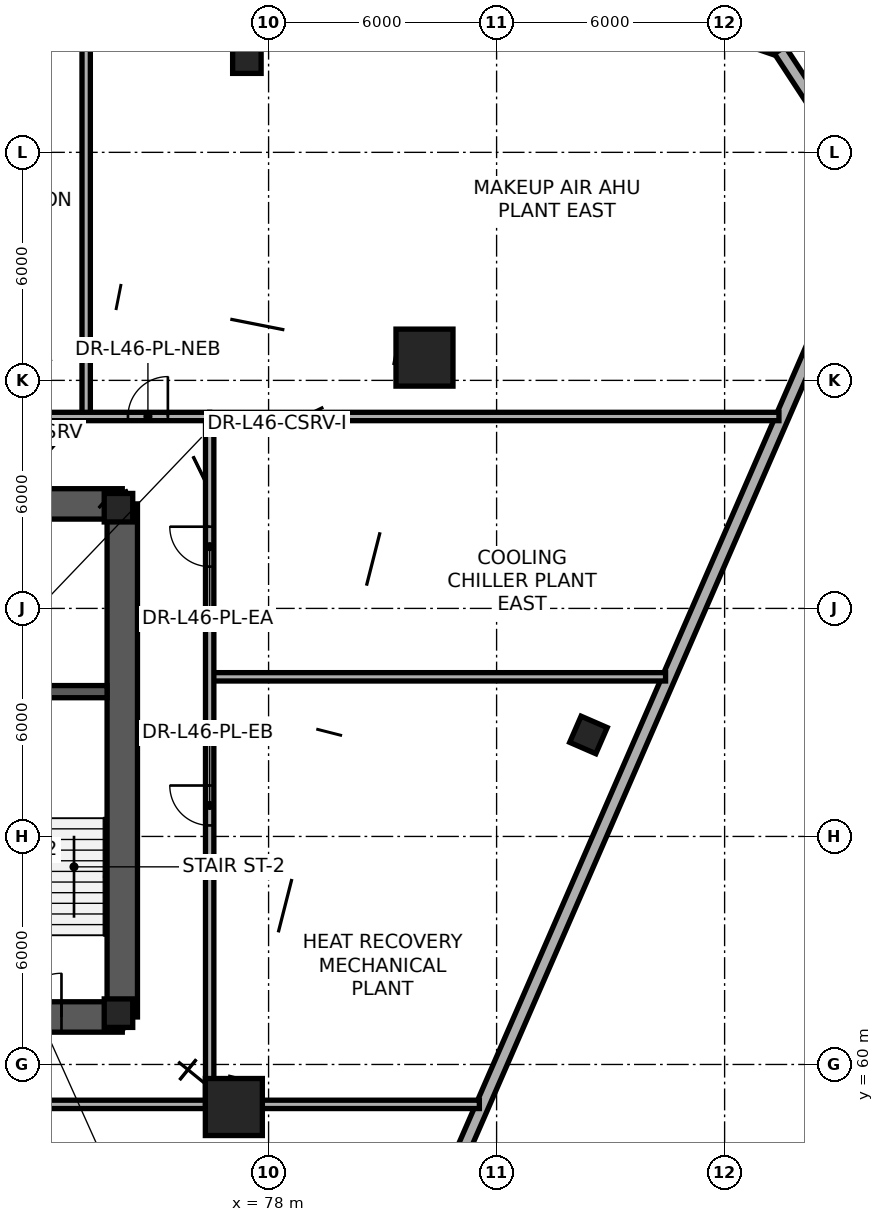
"""IFC4 building model, lengths in metres.
Left out: names, types, materials, properties, quantities, classifications, styles, units other than length and angle.
Written with IfcOpenShell. Run it as: python <this file> out.ifc"""

import sys

from ifc_helpers import new_model, si_unit, direction, frame, frame_2d, origin, origin_2d, place, context, subcontext, project, spatial, rectangle, extrude, element, fill, save


model = new_model("IFC4")
c1 = context("Model", 3, precision=1e-05, world=origin(), true_north=direction((0.0, 1.0)))
c2 = subcontext(c1, "Body", "Model", "MODEL_VIEW")
j1 = project(units=[si_unit("LENGTHUNIT", "METRE"), si_unit("PLANEANGLEUNIT", "RADIAN")], contexts=[c1])
p1 = place(None, origin())
s1 = spatial("IfcSite", under=j1, at=p1, CompositionType="ELEMENT")
p2 = place(p1, origin())
s2 = spatial("IfcBuilding", under=s1, at=p2, CompositionType="ELEMENT")
p3 = place(p2, frame((0.0, 0.0, 175.2)))
s3 = spatial("IfcBuildingStorey", under=s2, at=p3, CompositionType="ELEMENT", Elevation=175.2)
p4 = place(p3, frame((57.85, 61.25, 0.0), z_axis=(0.0, 0.0, 1.0), x_axis=(1.0, 0.0, 0.0)))
e1 = element("IfcWall", 1, at=p4, inside=s3, PredefinedType="SHEAR", context=c2, shape_type="SweptSolid", body=[
    extrude(rectangle(XDim=16.3, YDim=0.8, at=frame_2d((8.15, 0.0))), origin(), (0.0, 0.0, 1.0), 4.2),
])
p5 = place(p4, frame((1.35, 0.0, 0.0)))
e2 = element("IfcOpeningElement", 2, at=p5, cuts=e1, PredefinedType="OPENING", context=c2, shape_type="SweptSolid", body=[
    extrude(rectangle(XDim=1.15, YDim=2.15, at=frame_2d((0.575, 1.075))), frame((0.0, 0.41, 0.0), z_axis=(0.0, -1.0, 0.0), x_axis=(1.0, 0.0, 0.0)), (0.0, 0.0, 1.0), 0.82),
])
p6 = place(p4, frame((6.1, 0.0, 0.0)))
e3 = element("IfcOpeningElement", 3, at=p6, cuts=e1, PredefinedType="OPENING", context=c2, shape_type="SweptSolid", body=[
    extrude(rectangle(XDim=1.6, YDim=2.15, at=frame_2d((0.8, 1.075))), frame((0.0, 0.41, 0.0), z_axis=(0.0, -1.0, 0.0), x_axis=(1.0, 0.0, 0.0)), (0.0, 0.0, 1.0), 0.82),
])
p7 = place(p4, frame((13.55, 0.0, 0.0)))
e4 = element("IfcOpeningElement", 4, at=p7, cuts=e1, PredefinedType="OPENING", context=c2, shape_type="SweptSolid", body=[
    extrude(rectangle(XDim=1.15, YDim=2.15, at=frame_2d((0.575, 1.075))), frame((0.0, 0.41, 0.0), z_axis=(0.0, -1.0, 0.0), x_axis=(1.0, 0.0, 0.0)), (0.0, 0.0, 1.0), 0.82),
])
p8 = place(p3, frame((74.15, 61.25, 0.0), z_axis=(0.0, 0.0, 1.0), x_axis=(0.0, 1.0, 0.0)))
e5 = element("IfcWall", 5, at=p8, inside=s3, PredefinedType="SHEAR", context=c2, shape_type="SweptSolid", body=[
    extrude(rectangle(XDim=13.5, YDim=0.8, at=frame_2d((6.75, 0.0))), origin(), (0.0, 0.0, 1.0), 4.2),
])
p9 = place(p3, frame((74.15, 74.75, 0.0), z_axis=(0.0, 0.0, 1.0), x_axis=(-1.0, 0.0, 0.0)))
e6 = element("IfcWall", 6, at=p9, inside=s3, PredefinedType="SHEAR", context=c2, shape_type="SweptSolid", body=[
    extrude(rectangle(XDim=7.3, YDim=0.8, at=frame_2d((3.65, 0.0))), origin(), (0.0, 0.0, 1.0), 4.2),
])
p10 = place(p3, frame((69.91, 69.81, 0.0), z_axis=(0.0, 0.0, 1.0), x_axis=(1.0, 0.0, 0.0)))
e7 = element("IfcWall", 7, at=p10, inside=s3, PredefinedType="SHEAR", context=c2, shape_type="SweptSolid", body=[
    extrude(rectangle(XDim=3.84, YDim=0.32, at=frame_2d((1.92, 0.0))), origin(), (0.0, 0.0, 1.0), 4.2),
])
for number, where, z_axis, x_axis in (
    (8, (74.05, 61.35, 0.0), (0.0, 0.0, 1.0), (1.0, 0.0, 0.0)),
    (9, (74.05, 74.65, 0.0), (0.0, 0.0, 1.0), (1.0, 0.0, 0.0)),
):
    element("IfcColumn", number, at=place(p3, frame(where, z_axis=z_axis, x_axis=x_axis)), inside=s3, PredefinedType="COLUMN", context=c2, shape_type="SweptSolid", body=[
        extrude(rectangle(XDim=0.75, YDim=0.75, at=origin_2d()), origin(), (0.0, 0.0, 1.0), 4.2),
    ])
for number, where, z_axis, x_axis in (
    (10, (82.102, 78.599, 0.0), (0.0, 0.0, 1.0), (1.0, 0.0, 0.0)),
    (11, (77.086, 58.88, 0.0), (0.0, 0.0, 1.0), (1.0, 0.0, 0.0)),
):
    element("IfcColumn", number, at=place(p3, frame(where, z_axis=z_axis, x_axis=x_axis)), inside=s3, PredefinedType="COLUMN", context=c2, shape_type="SweptSolid", body=[
        extrude(rectangle(XDim=1.5, YDim=1.5, at=origin_2d()), origin(), (0.0, 0.0, 1.0), 4.2),
    ])
p11 = place(p3, frame((86.489, 68.681, 0.003), z_axis=(-0.034091169757, -0.004944964896, 0.999406493608), x_axis=(0.964125940683, -0.263559565569, 0.031583633399)))
e12 = element("IfcColumn", 12, at=p11, inside=s3, PredefinedType="COLUMN", context=c2, shape_type="SweptSolid", body=[
    extrude(rectangle(XDim=0.75, YDim=0.75, at=origin_2d()), origin(), (0.0, 0.0, 1.0), 4.197),
])
p12 = place(p3, frame((77.478, 86.513, 0.003), z_axis=(-0.023384322481, -0.029143148167, 0.999301681364), x_axis=(-0.779956681152, 0.625833504637, 0.0)))
e13 = element("IfcColumn", 13, at=p12, inside=s3, PredefinedType="COLUMN", context=c2, shape_type="SweptSolid", body=[
    extrude(rectangle(XDim=0.75, YDim=0.75, at=origin_2d()), origin(), (0.0, 0.0, 1.0), 4.197),
])
p13 = place(p3, frame((88.261, 87.786, 0.0), z_axis=(0.0, 0.0, 1.0), x_axis=(0.94595609767, -0.324294713618, 0.0)))
e14 = element("IfcWall", 14, at=p13, inside=s3, PredefinedType="STANDARD", context=c2, shape_type="SweptSolid", body=[
    extrude(rectangle(XDim=3.373, YDim=0.34, at=frame_2d((1.687, 0.0))), origin(), (0.0, 0.0, 1.0), 3.95),
])
p14 = place(p3, frame((91.452, 86.692, 0.0), z_axis=(0.0, 0.0, 1.0), x_axis=(0.548083892996, -0.836423365431, 0.0)))
e15 = element("IfcWall", 15, at=p14, inside=s3, PredefinedType="STANDARD", context=c2, shape_type="SweptSolid", body=[
    extrude(rectangle(XDim=3.373, YDim=0.34, at=frame_2d((1.686, 0.0))), origin(), (0.0, 0.0, 1.0), 3.95),
])
p15 = place(p3, frame((93.029, 80.51, 0.0), z_axis=(0.0, 0.0, 1.0), x_axis=(-0.399299124271, -0.916820707312, 0.0)))
e16 = element("IfcWall", 16, at=p15, inside=s3, PredefinedType="STANDARD", context=c2, shape_type="SweptSolid", body=[
    extrude(rectangle(XDim=55.751, YDim=0.34, at=frame_2d((27.876, 0.0))), origin(), (0.0, 0.0, 1.0), 0.85),
])
p16 = place(p3, frame((73.2, 77.05, 0.0), z_axis=(0.0, 0.0, 1.0), x_axis=(0.0, 1.0, 0.0)))
e17 = element("IfcWall", 17, at=p16, inside=s3, PredefinedType="PARTITIONING", context=c2, shape_type="SweptSolid", body=[
    extrude(rectangle(XDim=10.651, YDim=0.22, at=frame_2d((5.325, 0.0))), origin(), (0.0, 0.0, 1.0), 3.15),
])
p17 = place(p3, frame((76.45, 77.05, 0.0), z_axis=(0.0, 0.0, 1.0), x_axis=(1.0, 0.0, 0.0)))
e18 = element("IfcWall", 18, at=p17, inside=s3, PredefinedType="PARTITIONING", context=c2, shape_type="SweptSolid", body=[
    extrude(rectangle(XDim=14.98, YDim=0.22, at=frame_2d((7.49, 0.0))), origin(), (0.0, 0.0, 1.0), 3.15),
])
p18 = place(p3, frame((76.45, 70.2, 0.0), z_axis=(0.0, 0.0, 1.0), x_axis=(1.0, 0.0, 0.0)))
e19 = element("IfcWall", 19, at=p18, inside=s3, PredefinedType="PARTITIONING", context=c2, shape_type="SweptSolid", body=[
    extrude(rectangle(XDim=11.996, YDim=0.22, at=frame_2d((5.998, 0.0))), origin(), (0.0, 0.0, 1.0), 3.15),
])
p19 = place(p3, frame((76.45, 58.95, 0.0), z_axis=(0.0, 0.0, 1.0), x_axis=(1.0, 0.0, 0.0)))
e20 = element("IfcWall", 20, at=p19, inside=s3, PredefinedType="PARTITIONING", context=c2, shape_type="SweptSolid", body=[
    extrude(rectangle(XDim=7.097, YDim=0.22, at=frame_2d((3.548, 0.0))), origin(), (0.0, 0.0, 1.0), 3.15),
])
p20 = place(p3, frame((55.55, 58.95, 0.0), z_axis=(0.0, 0.0, 1.0), x_axis=(1.0, 0.0, 0.0)))
e21 = element("IfcWall", 21, at=p20, inside=s3, PredefinedType="PARTITIONING", context=c2, shape_type="SweptSolid", body=[
    extrude(rectangle(XDim=20.9, YDim=0.22, at=frame_2d((10.45, 0.0))), origin(), (0.0, 0.0, 1.0), 3.33),
])
p21 = place(p20, frame((9.7, 0.0, 0.0)))
e22 = element("IfcOpeningElement", 22, at=p21, cuts=e21, PredefinedType="OPENING", context=c2, shape_type="SweptSolid", body=[
    extrude(rectangle(XDim=1.5, YDim=2.2, at=frame_2d((0.75, 1.1))), frame((0.0, 0.12, 0.0), z_axis=(0.0, -1.0, 0.0), x_axis=(1.0, 0.0, 0.0)), (0.0, 0.0, 1.0), 0.24),
])
p22 = place(p3, frame((76.45, 58.95, 0.0), z_axis=(0.0, 0.0, 1.0), x_axis=(0.0, 1.0, 0.0)))
e23 = element("IfcWall", 23, at=p22, inside=s3, PredefinedType="PARTITIONING", context=c2, shape_type="SweptSolid", body=[
    extrude(rectangle(XDim=18.1, YDim=0.22, at=frame_2d((9.05, 0.0))), origin(), (0.0, 0.0, 1.0), 3.33),
])
p23 = place(p22, frame((7.34, 0.0, 0.0)))
e24 = element("IfcOpeningElement", 24, at=p23, cuts=e23, PredefinedType="OPENING", context=c2, shape_type="SweptSolid", body=[
    extrude(rectangle(XDim=1.05, YDim=2.15, at=frame_2d((0.525, 1.075))), frame((0.0, 0.12, 0.0), z_axis=(0.0, -1.0, 0.0), x_axis=(1.0, 0.0, 0.0)), (0.0, 0.0, 1.0), 0.24),
])
p24 = place(p22, frame((14.15, 0.0, 0.0)))
e25 = element("IfcOpeningElement", 25, at=p24, cuts=e23, PredefinedType="OPENING", context=c2, shape_type="SweptSolid", body=[
    extrude(rectangle(XDim=1.05, YDim=2.15, at=frame_2d((0.525, 1.075))), frame((0.0, 0.12, 0.0), z_axis=(0.0, -1.0, 0.0), x_axis=(1.0, 0.0, 0.0)), (0.0, 0.0, 1.0), 0.24),
])
p25 = place(p3, frame((55.55, 77.05, 0.0), z_axis=(0.0, 0.0, 1.0), x_axis=(1.0, 0.0, 0.0)))
e26 = element("IfcWall", 26, at=p25, inside=s3, PredefinedType="PARTITIONING", context=c2, shape_type="SweptSolid", body=[
    extrude(rectangle(XDim=20.9, YDim=0.22, at=frame_2d((10.45, 0.0))), origin(), (0.0, 0.0, 1.0), 3.33),
])
p26 = place(p25, frame((1.2, 0.0, 0.0)))
e27 = element("IfcOpeningElement", 27, at=p26, cuts=e26, PredefinedType="OPENING", context=c2, shape_type="SweptSolid", body=[
    extrude(rectangle(XDim=1.05, YDim=2.15, at=frame_2d((0.525, 1.075))), frame((0.0, 0.12, 0.0), z_axis=(0.0, -1.0, 0.0), x_axis=(1.0, 0.0, 0.0)), (0.0, 0.0, 1.0), 0.24),
])
p27 = place(p25, frame((6.425, 0.0, 0.0)))
e28 = element("IfcOpeningElement", 28, at=p27, cuts=e26, PredefinedType="OPENING", context=c2, shape_type="SweptSolid", body=[
    extrude(rectangle(XDim=1.05, YDim=2.15, at=frame_2d((0.525, 1.075))), frame((0.0, 0.12, 0.0), z_axis=(0.0, -1.0, 0.0), x_axis=(1.0, 0.0, 0.0)), (0.0, 0.0, 1.0), 0.24),
])
p28 = place(p25, frame((11.702, 0.0, 0.0)))
e29 = element("IfcOpeningElement", 29, at=p28, cuts=e26, PredefinedType="OPENING", context=c2, shape_type="SweptSolid", body=[
    extrude(rectangle(XDim=1.05, YDim=2.15, at=frame_2d((0.525, 1.075))), frame((0.0, 0.12, 0.0), z_axis=(0.0, -1.0, 0.0), x_axis=(1.0, 0.0, 0.0)), (0.0, 0.0, 1.0), 0.24),
])
p29 = place(p25, frame((18.75, 0.0, 0.0)))
e30 = element("IfcOpeningElement", 30, at=p29, cuts=e26, PredefinedType="OPENING", context=c2, shape_type="SweptSolid", body=[
    extrude(rectangle(XDim=1.05, YDim=2.15, at=frame_2d((0.525, 1.075))), frame((0.0, 0.12, 0.0), z_axis=(0.0, -1.0, 0.0), x_axis=(1.0, 0.0, 0.0)), (0.0, 0.0, 1.0), 0.24),
])
p30 = place(p7, origin())
e31 = element("IfcDoor", 31, at=p30, inside=s3, OperationType="SINGLE_SWING_RIGHT", PredefinedType="DOOR", context=c2, shape_type="SweptSolid", body=[
    extrude(rectangle(XDim=1.15, YDim=2.15, at=frame_2d((0.575, 1.075))), frame((0.0, 0.025, 0.0), z_axis=(0.0, -1.0, 0.0), x_axis=(1.0, 0.0, 0.0)), (0.0, 0.0, 1.0), 0.05),
])
fill(e4, e31)
p31 = place(p23, origin())
e32 = element("IfcDoor", 32, at=p31, inside=s3, OperationType="SINGLE_SWING_RIGHT", PredefinedType="DOOR", context=c2, shape_type="SweptSolid", body=[
    extrude(rectangle(XDim=1.05, YDim=2.15, at=frame_2d((0.525, 1.075))), frame((0.0, 0.025, 0.0), z_axis=(0.0, -1.0, 0.0), x_axis=(1.0, 0.0, 0.0)), (0.0, 0.0, 1.0), 0.05),
])
fill(e24, e32)
p32 = place(p24, origin())
e33 = element("IfcDoor", 33, at=p32, inside=s3, OperationType="SINGLE_SWING_RIGHT", PredefinedType="DOOR", context=c2, shape_type="SweptSolid", body=[
    extrude(rectangle(XDim=1.05, YDim=2.15, at=frame_2d((0.525, 1.075))), frame((0.0, 0.025, 0.0), z_axis=(0.0, -1.0, 0.0), x_axis=(1.0, 0.0, 0.0)), (0.0, 0.0, 1.0), 0.05),
])
fill(e25, e33)
p33 = place(p29, origin())
e34 = element("IfcDoor", 34, at=p33, inside=s3, OperationType="SINGLE_SWING_RIGHT", PredefinedType="DOOR", context=c2, shape_type="SweptSolid", body=[
    extrude(rectangle(XDim=1.05, YDim=2.15, at=frame_2d((0.525, 1.075))), frame((0.0, 0.025, 0.0), z_axis=(0.0, -1.0, 0.0), x_axis=(1.0, 0.0, 0.0)), (0.0, 0.0, 1.0), 0.05),
])
fill(e30, e34)
save(model, sys.argv[1])
